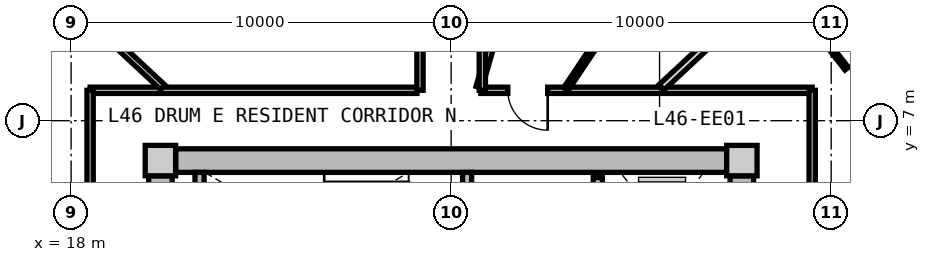
"""IFC4 building model, lengths in metres.
Left out: names, types, materials, properties, quantities, classifications, styles, units other than length and angle.
Written with IfcOpenShell. Run it as: python <this file> out.ifc"""

import sys

from ifc_helpers import new_model, si_unit, direction, frame, frame_2d, origin, origin_2d, place, context, subcontext, project, spatial, rectangle, extrude, source, transform, mapped, element, fill, save


model = new_model("IFC4")
c1 = context("Model", 3, precision=1e-05, world=origin(), true_north=direction((0.0, 1.0)))
c2 = subcontext(c1, "Body", "Model", "MODEL_VIEW")
j1 = project(units=[si_unit("LENGTHUNIT", "METRE"), si_unit("PLANEANGLEUNIT", "RADIAN")], contexts=[c1])
p1 = place(None, origin())
s1 = spatial("IfcSite", under=j1, at=p1, CompositionType="ELEMENT")
p2 = place(p1, origin())
s2 = spatial("IfcBuilding", under=s1, at=p2, CompositionType="ELEMENT")
p3 = place(p2, frame((0.0, 0.0, 149.55)))
s3 = spatial("IfcBuildingStorey", under=s2, at=p3, CompositionType="ELEMENT", Elevation=149.55)
m1 = source(origin(), c2, "Body", "SweptSolid", [
    extrude(rectangle(XDim=0.8, YDim=0.8, at=origin_2d()), origin(), (0.0, 0.0, 1.0), 3.05),
])
for number, where, z_axis, x_axis in (
    (1, (35.65, 5.95, 0.0), (0.0, 0.0, 1.0), (1.0, 0.0, 0.0)),
    (2, (20.35, 5.95, 0.0), (0.0, 0.0, 1.0), (1.0, 0.0, 0.0)),
):
    element("IfcColumn", number, at=place(p3, frame(where, z_axis=z_axis, x_axis=x_axis)), inside=s3, PredefinedType="COLUMN", context=c2, shape_type="MappedRepresentation", body=[
        mapped(m1, transform((0.0, 0.0, 0.0), x_axis=(1.0, 0.0, 0.0), y_axis=(0.0, 1.0, 0.0), z_axis=(0.0, 0.0, 1.0), scale=1.0)),
    ])
m2 = source(origin(), c2, "Body", "SweptSolid", [
    extrude(rectangle(XDim=14.5, YDim=0.62, at=frame_2d((7.25, 0.0))), origin(), (0.0, 0.0, 1.0), 2.81),
])
p4 = place(p3, frame((20.75, 5.95, 0.0), z_axis=(0.0, 0.0, 1.0), x_axis=(1.0, 0.0, 0.0)))
e3 = element("IfcWall", 3, at=p4, inside=s3, PredefinedType="SHEAR", context=c2, shape_type="MappedRepresentation", body=[
    mapped(m2, transform((0.0, 0.0, 0.0), x_axis=(1.0, 0.0, 0.0), y_axis=(0.0, 1.0, 0.0), z_axis=(0.0, 0.0, 1.0), scale=1.0)),
])
m3 = source(origin(), c2, "Body", "SweptSolid", [
    extrude(rectangle(XDim=11.1, YDim=0.62, at=frame_2d((5.55, 0.0))), origin(), (0.0, 0.0, 1.0), 2.81),
])
p5 = place(p3, frame((20.35, -5.55, 0.0), z_axis=(0.0, 0.0, 1.0), x_axis=(0.0, 1.0, 0.0)))
e4 = element("IfcWall", 4, at=p5, inside=s3, PredefinedType="SHEAR", context=c2, shape_type="MappedRepresentation", body=[
    mapped(m3, transform((0.0, 0.0, 0.0), x_axis=(1.0, 0.0, 0.0), y_axis=(0.0, 1.0, 0.0), z_axis=(0.0, 0.0, 1.0), scale=1.0)),
])
p6 = place(p5, frame((3.8, 0.0, 0.0)))
e5 = element("IfcOpeningElement", 5, at=p6, cuts=e4, PredefinedType="OPENING", context=c2, shape_type="SweptSolid", body=[
    extrude(rectangle(XDim=1.2, YDim=2.15, at=frame_2d((0.6, 1.075))), frame((0.0, 0.32, 0.0), z_axis=(0.0, -1.0, 0.0), x_axis=(1.0, 0.0, 0.0)), (0.0, 0.0, 1.0), 0.64),
])
p7 = place(p3, frame((35.65, 5.55, 0.0), z_axis=(0.0, 0.0, 1.0), x_axis=(0.0, -1.0, 0.0)))
e6 = element("IfcWall", 6, at=p7, inside=s3, PredefinedType="SHEAR", context=c2, shape_type="MappedRepresentation", body=[
    mapped(m3, transform((0.0, 0.0, 0.0), x_axis=(1.0, 0.0, 0.0), y_axis=(0.0, 1.0, 0.0), z_axis=(0.0, 0.0, 1.0), scale=1.0)),
])
p8 = place(p7, frame((5.65, 0.0, 0.0)))
e7 = element("IfcOpeningElement", 7, at=p8, cuts=e6, PredefinedType="OPENING", context=c2, shape_type="SweptSolid", body=[
    extrude(rectangle(XDim=1.2, YDim=2.15, at=frame_2d((0.6, 1.075))), frame((0.0, 0.32, 0.0), z_axis=(0.0, -1.0, 0.0), x_axis=(1.0, 0.0, 0.0)), (0.0, 0.0, 1.0), 0.64),
])
p9 = place(p7, frame((9.3, 0.0, 0.0)))
e8 = element("IfcOpeningElement", 8, at=p9, cuts=e6, PredefinedType="OPENING", context=c2, shape_type="SweptSolid", body=[
    extrude(rectangle(XDim=1.0, YDim=2.1, at=frame_2d((0.5, 1.05))), frame((0.0, 0.32, 0.0), z_axis=(0.0, -1.0, 0.0), x_axis=(1.0, 0.0, 0.0)), (0.0, 0.0, 1.0), 0.64),
])
m4 = source(origin(), c2, "Body", "SweptSolid", [
    extrude(rectangle(XDim=3.19, YDim=0.24, at=frame_2d((1.595, 0.0))), origin(), (0.0, 0.0, 1.0), 2.81),
])
p10 = place(p3, frame((21.38, 2.45, 0.0), z_axis=(0.0, 0.0, 1.0), x_axis=(0.0, 1.0, 0.0)))
e9 = element("IfcWall", 9, at=p10, inside=s3, PredefinedType="PARTITIONING", context=c2, shape_type="MappedRepresentation", body=[
    mapped(m4, transform((0.0, 0.0, 0.0), x_axis=(1.0, 0.0, 0.0), y_axis=(0.0, 1.0, 0.0), z_axis=(0.0, 0.0, 1.0), scale=1.0)),
])
p11 = place(p3, frame((28.42, 2.45, 0.0), z_axis=(0.0, 0.0, 1.0), x_axis=(0.0, 1.0, 0.0)))
e10 = element("IfcWall", 10, at=p11, inside=s3, PredefinedType="PARTITIONING", context=c2, shape_type="MappedRepresentation", body=[
    mapped(m4, transform((0.0, 0.0, 0.0), x_axis=(1.0, 0.0, 0.0), y_axis=(0.0, 1.0, 0.0), z_axis=(0.0, 0.0, 1.0), scale=1.0)),
])
p12 = place(p11, frame((0.55, 0.0, 0.0)))
e11 = element("IfcOpeningElement", 11, at=p12, cuts=e10, PredefinedType="OPENING", context=c2, shape_type="SweptSolid", body=[
    extrude(rectangle(XDim=1.1, YDim=2.15, at=frame_2d((0.55, 1.075))), frame((0.0, 0.13, 0.0), z_axis=(0.0, -1.0, 0.0), x_axis=(1.0, 0.0, 0.0)), (0.0, 0.0, 1.0), 0.26),
])
m5 = source(origin(), c2, "Body", "SweptSolid", [
    extrude(rectangle(XDim=5.0, YDim=0.24, at=frame_2d((2.5, 0.0))), origin(), (0.0, 0.0, 1.0), 2.795),
])
p13 = place(p3, frame((31.86, 0.5, 0.0), z_axis=(0.0, 0.0, 1.0), x_axis=(0.0, 1.0, 0.0)))
e12 = element("IfcWall", 12, at=p13, inside=s3, PredefinedType="PARTITIONING", context=c2, shape_type="MappedRepresentation", body=[
    mapped(m5, transform((0.0, 0.0, 0.0), x_axis=(1.0, 0.0, 0.0), y_axis=(0.0, 1.0, 0.0), z_axis=(0.0, 0.0, 1.0), scale=1.0)),
])
p14 = place(p13, frame((3.05, 0.0, 0.0)))
e13 = element("IfcOpeningElement", 13, at=p14, cuts=e12, PredefinedType="OPENING", context=c2, shape_type="SweptSolid", body=[
    extrude(rectangle(XDim=1.3, YDim=2.2, at=frame_2d((0.65, 1.1))), frame((0.0, 0.13, 0.0), z_axis=(0.0, -1.0, 0.0), x_axis=(1.0, 0.0, 0.0)), (0.0, 0.0, 1.0), 0.26),
])
p15 = place(p13, frame((0.55, 0.0, 0.0)))
e14 = element("IfcOpeningElement", 14, at=p15, cuts=e12, PredefinedType="OPENING", context=c2, shape_type="SweptSolid", body=[
    extrude(rectangle(XDim=1.3, YDim=2.2, at=frame_2d((0.65, 1.1))), frame((0.0, 0.13, 0.0), z_axis=(0.0, -1.0, 0.0), x_axis=(1.0, 0.0, 0.0)), (0.0, 0.0, 1.0), 0.26),
])
m6 = source(origin(), c2, "Body", "SweptSolid", [
    extrude(rectangle(XDim=8.6, YDim=0.165, at=frame_2d((4.3, 0.0))), origin(), (0.0, 0.0, 1.0), 2.795),
])
p16 = place(p3, frame((18.5, 7.8, 0.0), z_axis=(0.0, 0.0, 1.0), x_axis=(1.0, 0.0, 0.0)))
e15 = element("IfcWall", 15, at=p16, inside=s3, PredefinedType="PARTITIONING", context=c2, shape_type="MappedRepresentation", body=[
    mapped(m6, transform((0.0, 0.0, 0.0), x_axis=(1.0, 0.0, 0.0), y_axis=(0.0, 1.0, 0.0), z_axis=(0.0, 0.0, 1.0), scale=1.0)),
])
m7 = source(origin(), c2, "Body", "SweptSolid", [
    extrude(rectangle(XDim=8.719, YDim=0.165, at=frame_2d((4.36, 0.0))), origin(), (0.0, 0.0, 1.0), 2.795),
])
p17 = place(p3, frame((28.781, 7.8, 0.0), z_axis=(0.0, 0.0, 1.0), x_axis=(1.0, 0.0, 0.0)))
e16 = element("IfcWall", 16, at=p17, inside=s3, PredefinedType="PARTITIONING", context=c2, shape_type="MappedRepresentation", body=[
    mapped(m7, transform((0.0, 0.0, 0.0), x_axis=(1.0, 0.0, 0.0), y_axis=(0.0, 1.0, 0.0), z_axis=(0.0, 0.0, 1.0), scale=1.0)),
])
p18 = place(p17, frame((0.71, 0.0, 0.0)))
e17 = element("IfcOpeningElement", 17, at=p18, cuts=e16, PredefinedType="OPENING", context=c2, shape_type="SweptSolid", body=[
    extrude(rectangle(XDim=1.05, YDim=2.15, at=frame_2d((0.525, 1.075))), frame((0.0, 0.093, 0.0), z_axis=(0.0, -1.0, 0.0), x_axis=(1.0, 0.0, 0.0)), (0.0, 0.0, 1.0), 0.185),
])
m8 = source(origin(), c2, "Body", "SweptSolid", [
    extrude(rectangle(XDim=15.6, YDim=0.165, at=frame_2d((7.8, 0.0))), origin(), (0.0, 0.0, 1.0), 2.795),
])
p19 = place(p3, frame((18.5, -7.8, 0.0), z_axis=(0.0, 0.0, 1.0), x_axis=(0.0, 1.0, 0.0)))
e18 = element("IfcWall", 18, at=p19, inside=s3, PredefinedType="PARTITIONING", context=c2, shape_type="MappedRepresentation", body=[
    mapped(m8, transform((0.0, 0.0, 0.0), x_axis=(1.0, 0.0, 0.0), y_axis=(0.0, 1.0, 0.0), z_axis=(0.0, 0.0, 1.0), scale=1.0)),
])
p20 = place(p19, frame((7.175, 0.0, 0.0)))
e19 = element("IfcOpeningElement", 19, at=p20, cuts=e18, PredefinedType="OPENING", context=c2, shape_type="SweptSolid", body=[
    extrude(rectangle(XDim=1.25, YDim=2.2, at=frame_2d((0.625, 1.1))), frame((0.0, 0.093, 0.0), z_axis=(0.0, -1.0, 0.0), x_axis=(1.0, 0.0, 0.0)), (0.0, 0.0, 1.0), 0.185),
])
p21 = place(p3, frame((37.5, 7.8, 0.0), z_axis=(0.0, 0.0, 1.0), x_axis=(0.0, -1.0, 0.0)))
e20 = element("IfcWall", 20, at=p21, inside=s3, PredefinedType="PARTITIONING", context=c2, shape_type="MappedRepresentation", body=[
    mapped(m8, transform((0.0, 0.0, 0.0), x_axis=(1.0, 0.0, 0.0), y_axis=(0.0, 1.0, 0.0), z_axis=(0.0, 0.0, 1.0), scale=1.0)),
])
p22 = place(p21, frame((5.687, 0.0, 0.0)))
e21 = element("IfcOpeningElement", 21, at=p22, cuts=e20, PredefinedType="OPENING", context=c2, shape_type="SweptSolid", body=[
    extrude(rectangle(XDim=1.05, YDim=2.15, at=frame_2d((0.525, 1.075))), frame((0.0, 0.093, 0.0), z_axis=(0.0, -1.0, 0.0), x_axis=(1.0, 0.0, 0.0)), (0.0, 0.0, 1.0), 0.185),
])
m9 = source(origin(), c2, "Body", "SweptSolid", [
    extrude(rectangle(XDim=9.73, YDim=0.165, at=frame_2d((4.865, 0.0))), origin(), (0.0, 0.0, 1.0), 2.345),
])
p23 = place(p3, frame((28.733, 7.88, 0.0), z_axis=(0.0, 0.0, 1.0), x_axis=(0.27679492614, 0.960929013436, 0.0)))
e22 = element("IfcWall", 22, at=p23, inside=s3, PredefinedType="PARTITIONING", context=c2, shape_type="MappedRepresentation", body=[
    mapped(m9, transform((0.0, 0.0, 0.0), x_axis=(1.0, 0.0, 0.0), y_axis=(0.0, 1.0, 0.0), z_axis=(0.0, 0.0, 1.0), scale=1.0)),
])
m10 = source(origin(), c2, "Body", "SweptSolid", [
    extrude(rectangle(XDim=7.648, YDim=0.165, at=frame_2d((3.824, 0.0))), origin(), (0.0, 0.0, 1.0), 2.345),
])
p24 = place(p3, frame((20.413, 7.88, 0.0), z_axis=(0.0, 0.0, 1.0), x_axis=(-0.732182665826, 0.681108320213, 0.0)))
e23 = element("IfcWall", 23, at=p24, inside=s3, PredefinedType="PARTITIONING", context=c2, shape_type="MappedRepresentation", body=[
    mapped(m10, transform((0.0, 0.0, 0.0), x_axis=(1.0, 0.0, 0.0), y_axis=(0.0, 1.0, 0.0), z_axis=(0.0, 0.0, 1.0), scale=1.0)),
])
m11 = source(origin(), c2, "Body", "SweptSolid", [
    extrude(rectangle(XDim=8.235, YDim=0.165, at=frame_2d((4.118, 0.0))), origin(), (0.0, 0.0, 1.0), 2.795),
])
p25 = place(p3, frame((27.18, 7.8, 0.0), z_axis=(0.0, 0.0, 1.0), x_axis=(0.0, 1.0, 0.0)))
e24 = element("IfcWall", 24, at=p25, inside=s3, PredefinedType="PARTITIONING", context=c2, shape_type="MappedRepresentation", body=[
    mapped(m11, transform((0.0, 0.0, 0.0), x_axis=(1.0, 0.0, 0.0), y_axis=(0.0, 1.0, 0.0), z_axis=(0.0, 0.0, 1.0), scale=1.0)),
])
p26 = place(p25, frame((3.593, 0.0, 0.0)))
e25 = element("IfcOpeningElement", 25, at=p26, cuts=e24, PredefinedType="OPENING", context=c2, shape_type="SweptSolid", body=[
    extrude(rectangle(XDim=1.05, YDim=2.15, at=frame_2d((0.525, 1.075))), frame((0.0, 0.093, 0.0), z_axis=(0.0, -1.0, 0.0), x_axis=(1.0, 0.0, 0.0)), (0.0, 0.0, 1.0), 0.185),
])
p27 = place(p3, frame((28.82, 7.8, 0.0), z_axis=(0.0, 0.0, 1.0), x_axis=(0.0, 1.0, 0.0)))
e26 = element("IfcWall", 26, at=p27, inside=s3, PredefinedType="PARTITIONING", context=c2, shape_type="MappedRepresentation", body=[
    mapped(m11, transform((0.0, 0.0, 0.0), x_axis=(1.0, 0.0, 0.0), y_axis=(0.0, 1.0, 0.0), z_axis=(0.0, 0.0, 1.0), scale=1.0)),
])
p28 = place(p27, frame((3.813, 0.0, 0.0)))
e27 = element("IfcOpeningElement", 27, at=p28, cuts=e26, PredefinedType="OPENING", context=c2, shape_type="SweptSolid", body=[
    extrude(rectangle(XDim=1.05, YDim=2.15, at=frame_2d((0.525, 1.075))), frame((0.0, 0.093, 0.0), z_axis=(0.0, -1.0, 0.0), x_axis=(1.0, 0.0, 0.0)), (0.0, 0.0, 1.0), 0.185),
])
m12 = source(origin(), c2, "Body", "SweptSolid", [
    extrude(rectangle(XDim=7.648, YDim=0.19, at=frame_2d((3.824, 0.0))), origin(), (0.0, 0.0, 1.0), 2.345),
])
p29 = place(p3, frame((33.538, 7.88, 0.0), z_axis=(0.0, 0.0, 1.0), x_axis=(0.732167856666, 0.681124239522, 0.0)))
e28 = element("IfcWall", 28, at=p29, inside=s3, PredefinedType="PARTITIONING", context=c2, shape_type="MappedRepresentation", body=[
    mapped(m12, transform((0.0, 0.0, 0.0), x_axis=(1.0, 0.0, 0.0), y_axis=(0.0, 1.0, 0.0), z_axis=(0.0, 0.0, 1.0), scale=1.0)),
])
m13 = source(origin(), c2, "Body", "SweptSolid", [
    extrude(rectangle(XDim=6.966, YDim=0.115, at=frame_2d((3.483, 0.0))), origin(), (0.0, 0.0, 1.0), 2.795),
])
p30 = place(p3, frame((40.85, 5.254, 0.0), z_axis=(0.0, 0.0, 1.0), x_axis=(-0.616695640563, 0.787201681217, 0.0)))
e29 = element("IfcWall", 29, at=p30, inside=s3, PredefinedType="PARTITIONING", context=c2, shape_type="MappedRepresentation", body=[
    mapped(m13, transform((0.0, 0.0, 0.0), x_axis=(1.0, 0.0, 0.0), y_axis=(0.0, 1.0, 0.0), z_axis=(0.0, 0.0, 1.0), scale=1.0)),
])
p31 = place(p30, frame((3.008, 0.0, 0.0)))
e30 = element("IfcOpeningElement", 30, at=p31, cuts=e29, PredefinedType="OPENING", context=c2, shape_type="SweptSolid", body=[
    extrude(rectangle(XDim=0.95, YDim=2.1, at=frame_2d((0.475, 1.05))), frame((0.0, 0.067, 0.0), z_axis=(0.0, -1.0, 0.0), x_axis=(1.0, 0.0, 0.0)), (0.0, 0.0, 1.0), 0.135),
])
m14 = source(origin(), c2, "Body", "SweptSolid", [
    extrude(rectangle(XDim=4.593, YDim=0.14, at=frame_2d((2.296, 0.0))), origin(), (0.0, 0.0, 1.0), 2.795),
])
p32 = place(p3, frame((31.019, 7.83, 0.0), z_axis=(0.0, 0.0, 1.0), x_axis=(0.555362412301, 0.831608436107, 0.0)))
e31 = element("IfcWall", 31, at=p32, inside=s3, PredefinedType="PARTITIONING", context=c2, shape_type="MappedRepresentation", body=[
    mapped(m14, transform((0.0, 0.0, 0.0), x_axis=(1.0, 0.0, 0.0), y_axis=(0.0, 1.0, 0.0), z_axis=(0.0, 0.0, 1.0), scale=1.0)),
])
p33 = place(p32, frame((1.836, 0.0, 0.0)))
e32 = element("IfcOpeningElement", 32, at=p33, cuts=e31, PredefinedType="OPENING", context=c2, shape_type="SweptSolid", body=[
    extrude(rectangle(XDim=0.92, YDim=2.1, at=frame_2d((0.46, 1.05))), frame((0.0, 0.08, 0.0), z_axis=(0.0, -1.0, 0.0), x_axis=(1.0, 0.0, 0.0)), (0.0, 0.0, 1.0), 0.16),
])
m15 = source(origin(), c2, "Body", "SweptSolid", [
    extrude(rectangle(XDim=0.95, YDim=2.1, at=frame_2d((0.475, 1.05))), frame((0.0, 0.025, 0.0), z_axis=(0.0, -1.0, 0.0), x_axis=(1.0, 0.0, 0.0)), (0.0, 0.0, 1.0), 0.05),
])
p34 = place(p31, frame((0.95, 0.0, 0.0), z_axis=(0.0, 0.0, 1.0), x_axis=(-1.0, 0.0, 0.0)))
e33 = element("IfcDoor", 33, at=p34, inside=s3, OperationType="SINGLE_SWING_LEFT", PredefinedType="DOOR", context=c2, shape_type="MappedRepresentation", body=[
    mapped(m15, transform((0.0, 0.0, 0.0), x_axis=(1.0, 0.0, 0.0), y_axis=(0.0, 1.0, 0.0), z_axis=(0.0, 0.0, 1.0), scale=1.0)),
])
fill(e30, e33)
m16 = source(origin(), c2, "Body", "SweptSolid", [
    extrude(rectangle(XDim=1.05, YDim=2.15, at=frame_2d((0.525, 1.075))), frame((0.0, 0.025, 0.0), z_axis=(0.0, -1.0, 0.0), x_axis=(1.0, 0.0, 0.0)), (0.0, 0.0, 1.0), 0.05),
])
p35 = place(p18, frame((1.05, 0.0, 0.0), z_axis=(0.0, 0.0, 1.0), x_axis=(-1.0, 0.0, 0.0)))
e34 = element("IfcDoor", 34, at=p35, inside=s3, OperationType="SINGLE_SWING_LEFT", PredefinedType="DOOR", context=c2, shape_type="MappedRepresentation", body=[
    mapped(m16, transform((0.0, 0.0, 0.0), x_axis=(1.0, 0.0, 0.0), y_axis=(0.0, 1.0, 0.0), z_axis=(0.0, 0.0, 1.0), scale=1.0)),
])
fill(e17, e34)
save(model, sys.argv[1])
